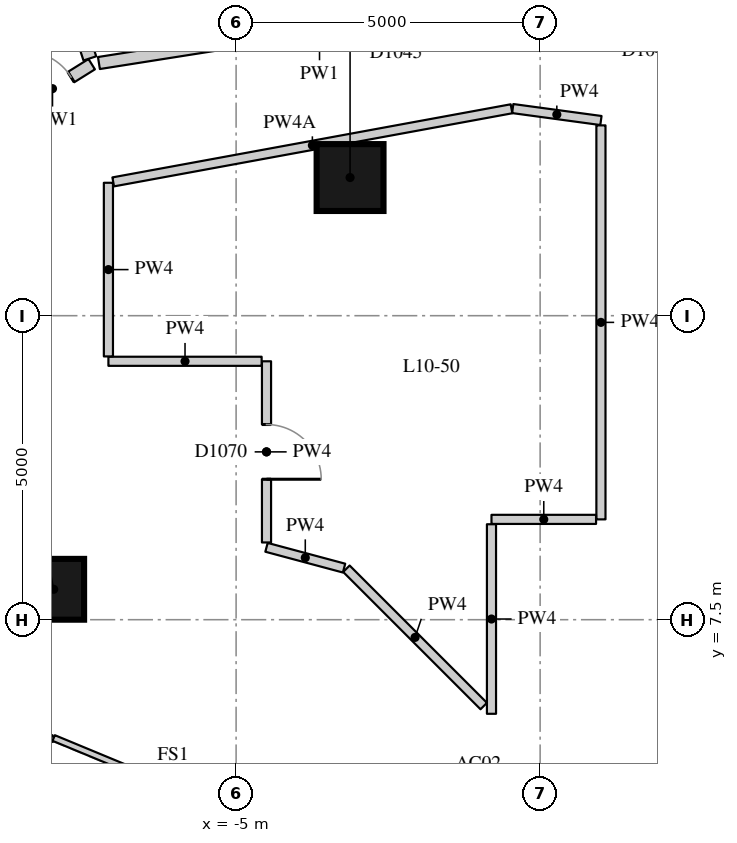
"""IFC4 building model, lengths in metres.
Left out: names, types, materials, properties, quantities, classifications, styles, units other than length and angle.
Written with IfcOpenShell. Run it as: python <this file> out.ifc"""

import sys

from ifc_helpers import new_model, si_unit, direction, frame, frame_2d, origin, origin_2d, place, context, subcontext, project, spatial, rectangle, extrude, element, fill, save


model = new_model("IFC4")
c1 = context("Model", 3, precision=1e-05, world=origin(), true_north=direction((0.0, 1.0)))
c2 = subcontext(c1, "Body", "Model", "MODEL_VIEW")
j1 = project(units=[si_unit("LENGTHUNIT", "METRE"), si_unit("PLANEANGLEUNIT", "RADIAN")], contexts=[c1])
p1 = place(None, origin())
s1 = spatial("IfcSite", under=j1, at=p1, CompositionType="ELEMENT")
p2 = place(p1, origin())
s2 = spatial("IfcBuilding", under=s1, at=p2, CompositionType="ELEMENT")
p3 = place(p2, frame((0.0, 0.0, 41.5)))
s3 = spatial("IfcBuildingStorey", under=s2, at=p3, CompositionType="ELEMENT", Elevation=41.5)
p4 = place(p3, frame((-8.0, 8.0, 0.0), z_axis=(0.0, 0.0, 1.0), x_axis=(1.0, 0.0, 0.0)))
e1 = element("IfcColumn", 1, at=p4, inside=s3, PredefinedType="COLUMN", context=c2, shape_type="SweptSolid", body=[
    extrude(rectangle(XDim=1.0, YDim=1.0, at=origin_2d()), origin(), (0.0, 0.0, 1.0), 3.3),
])
p5 = place(p3, frame((-3.126, 14.772, 0.0), z_axis=(0.0, 0.0, 1.0), x_axis=(1.0, 0.0, 0.0)))
e2 = element("IfcColumn", 2, at=p5, inside=s3, PredefinedType="COLUMN", context=c2, shape_type="SweptSolid", body=[
    extrude(rectangle(XDim=1.1, YDim=1.1, at=origin_2d()), origin(), (0.0, 0.0, 1.0), 3.3),
])
p6 = place(p3, frame((-8.664, 15.832, 0.0), z_axis=(0.0, 0.0, 1.0), x_axis=(0.848304931689, 0.529508019648, 0.0)))
e3 = element("IfcWall", 3, at=p6, inside=s3, PredefinedType="PARTITIONING", context=c2, shape_type="SweptSolid", body=[
    extrude(rectangle(XDim=1.52, YDim=0.2, at=frame_2d((0.76, 0.0))), origin(), (0.0, 0.0, 1.0), 3.02),
])
p7 = place(p6, frame((0.22, 0.0, 0.0)))
e4 = element("IfcOpeningElement", 4, at=p7, cuts=e3, PredefinedType="OPENING", context=c2, shape_type="SweptSolid", body=[
    extrude(rectangle(XDim=0.9, YDim=2.1, at=frame_2d((0.45, 1.05))), frame((0.0, 0.11, 0.0), z_axis=(0.0, -1.0, 0.0), x_axis=(1.0, 0.0, 0.0)), (0.0, 0.0, 1.0), 0.22),
])
p8 = place(p3, frame((-7.256, 16.656, 0.0), z_axis=(0.0, 0.0, 1.0), x_axis=(0.987787475409, 0.15580726371, 0.0)))
e5 = element("IfcWall", 5, at=p8, inside=s3, PredefinedType="PARTITIONING", context=c2, shape_type="SweptSolid", body=[
    extrude(rectangle(XDim=7.346, YDim=0.2, at=frame_2d((3.673, 0.0))), origin(), (0.0, 0.0, 1.0), 3.02),
])
p9 = place(p8, frame((3.86, 0.0, 0.0)))
e6 = element("IfcOpeningElement", 6, at=p9, cuts=e5, PredefinedType="OPENING", context=c2, shape_type="SweptSolid", body=[
    extrude(rectangle(XDim=1.1, YDim=2.1, at=frame_2d((0.55, 1.05))), frame((0.0, 0.11, 0.0), z_axis=(0.0, -1.0, 0.0), x_axis=(1.0, 0.0, 0.0)), (0.0, 0.0, 1.0), 0.22),
])
p10 = place(p3, frame((0.098, 17.777, 0.0), z_axis=(0.0, 0.0, 1.0), x_axis=(0.97258196627, -0.232560355362, 0.0)))
e7 = element("IfcWall", 7, at=p10, inside=s3, PredefinedType="PARTITIONING", context=c2, shape_type="SweptSolid", body=[
    extrude(rectangle(XDim=10.933, YDim=0.2, at=frame_2d((5.466, 0.0))), origin(), (0.0, 0.0, 1.0), 3.02),
])
p11 = place(p10, frame((9.613, 0.0, 0.0)))
e8 = element("IfcOpeningElement", 8, at=p11, cuts=e7, PredefinedType="OPENING", context=c2, shape_type="SweptSolid", body=[
    extrude(rectangle(XDim=1.1, YDim=2.1, at=frame_2d((0.55, 1.05))), frame((0.0, 0.11, 0.0), z_axis=(0.0, -1.0, 0.0), x_axis=(1.0, 0.0, 0.0)), (0.0, 0.0, 1.0), 0.22),
])
p12 = place(p10, frame((4.325, 0.0, 0.0)))
e9 = element("IfcOpeningElement", 9, at=p12, cuts=e7, PredefinedType="OPENING", context=c2, shape_type="SweptSolid", body=[
    extrude(rectangle(XDim=1.0, YDim=2.1, at=frame_2d((0.5, 1.05))), frame((0.0, 0.11, 0.0), z_axis=(0.0, -1.0, 0.0), x_axis=(1.0, 0.0, 0.0)), (0.0, 0.0, 1.0), 0.22),
])
p13 = place(p10, frame((1.276, 0.0, 0.0)))
e10 = element("IfcOpeningElement", 10, at=p13, cuts=e7, PredefinedType="OPENING", context=c2, shape_type="SweptSolid", body=[
    extrude(rectangle(XDim=0.9, YDim=2.1, at=frame_2d((0.45, 1.05))), frame((0.0, 0.11, 0.0), z_axis=(0.0, -1.0, 0.0), x_axis=(1.0, 0.0, 0.0)), (0.0, 0.0, 1.0), 0.22),
])
p14 = place(p3, frame((-0.451, 15.907, 0.0), z_axis=(0.0, 0.0, 1.0), x_axis=(0.99094751199, -0.134249873301, 0.0)))
e11 = element("IfcWall", 11, at=p14, inside=s3, PredefinedType="PARTITIONING", context=c2, shape_type="SweptSolid", body=[
    extrude(rectangle(XDim=1.464, YDim=0.15, at=frame_2d((0.732, 0.0))), origin(), (0.0, 0.0, 1.0), 3.02),
])
p15 = place(p3, frame((1.0, 15.63, 0.0), z_axis=(0.0, 0.0, 1.0), x_axis=(0.0, -1.0, 0.0)))
e12 = element("IfcWall", 12, at=p15, inside=s3, PredefinedType="PARTITIONING", context=c2, shape_type="SweptSolid", body=[
    extrude(rectangle(XDim=6.48, YDim=0.15, at=frame_2d((3.24, 0.0))), origin(), (0.0, 0.0, 1.0), 2.47),
])
p16 = place(p3, frame((0.92, 9.15, 0.0), z_axis=(0.0, 0.0, 1.0), x_axis=(-1.0, 0.0, 0.0)))
e13 = element("IfcWall", 13, at=p16, inside=s3, PredefinedType="PARTITIONING", context=c2, shape_type="SweptSolid", body=[
    extrude(rectangle(XDim=1.72, YDim=0.15, at=frame_2d((0.86, 0.0))), origin(), (0.0, 0.0, 1.0), 3.02),
])
p17 = place(p3, frame((-0.8, 9.07, 0.0), z_axis=(0.0, 0.0, 1.0), x_axis=(0.0, -1.0, 0.0)))
e14 = element("IfcWall", 14, at=p17, inside=s3, PredefinedType="PARTITIONING", context=c2, shape_type="SweptSolid", body=[
    extrude(rectangle(XDim=3.118, YDim=0.15, at=frame_2d((1.559, 0.0))), origin(), (0.0, 0.0, 1.0), 3.02),
])
p18 = place(p3, frame((-0.927, 6.08, 0.0), z_axis=(0.0, 0.0, 1.0), x_axis=(-0.707106781187, 0.707106781187, 0.0)))
e15 = element("IfcWall", 15, at=p18, inside=s3, PredefinedType="PARTITIONING", context=c2, shape_type="SweptSolid", body=[
    extrude(rectangle(XDim=3.194, YDim=0.15, at=frame_2d((1.597, 0.0))), origin(), (0.0, 0.0, 1.0), 3.02),
])
p19 = place(p3, frame((-3.225, 8.348, 0.0), z_axis=(0.0, 0.0, 1.0), x_axis=(-0.965915035697, 0.258859312783, 0.0)))
e16 = element("IfcWall", 16, at=p19, inside=s3, PredefinedType="PARTITIONING", context=c2, shape_type="SweptSolid", body=[
    extrude(rectangle(XDim=1.32, YDim=0.15, at=frame_2d((0.66, 0.0))), origin(), (0.0, 0.0, 1.0), 3.02),
])
p20 = place(p3, frame((-4.5, 8.77, 0.0), z_axis=(0.0, 0.0, 1.0), x_axis=(0.0, 1.0, 0.0)))
e17 = element("IfcWall", 17, at=p20, inside=s3, PredefinedType="PARTITIONING", context=c2, shape_type="SweptSolid", body=[
    extrude(rectangle(XDim=2.98, YDim=0.15, at=frame_2d((1.49, 0.0))), origin(), (0.0, 0.0, 1.0), 3.02),
])
p21 = place(p20, frame((1.04, 0.0, 0.0)))
e18 = element("IfcOpeningElement", 18, at=p21, cuts=e17, PredefinedType="OPENING", context=c2, shape_type="SweptSolid", body=[
    extrude(rectangle(XDim=0.9, YDim=2.1, at=frame_2d((0.45, 1.05))), frame((0.0, 0.085, 0.0), z_axis=(0.0, -1.0, 0.0), x_axis=(1.0, 0.0, 0.0)), (0.0, 0.0, 1.0), 0.17),
])
p22 = place(p3, frame((-4.58, 11.75, 0.0), z_axis=(0.0, 0.0, 1.0), x_axis=(-1.0, 0.0, 0.0)))
e19 = element("IfcWall", 19, at=p22, inside=s3, PredefinedType="PARTITIONING", context=c2, shape_type="SweptSolid", body=[
    extrude(rectangle(XDim=2.52, YDim=0.15, at=frame_2d((1.26, 0.0))), origin(), (0.0, 0.0, 1.0), 3.02),
])
p23 = place(p3, frame((-7.1, 11.83, 0.0), z_axis=(0.0, 0.0, 1.0), x_axis=(0.0, 1.0, 0.0)))
e20 = element("IfcWall", 20, at=p23, inside=s3, PredefinedType="PARTITIONING", context=c2, shape_type="SweptSolid", body=[
    extrude(rectangle(XDim=2.856, YDim=0.15, at=frame_2d((1.428, 0.0))), origin(), (0.0, 0.0, 1.0), 3.02),
])
p24 = place(p3, frame((-7.021, 14.701, 0.0), z_axis=(0.0, 0.0, 1.0), x_axis=(0.983567630435, 0.180540068573, 0.0)))
e21 = element("IfcWall", 21, at=p24, inside=s3, PredefinedType="PARTITIONING", context=c2, shape_type="SweptSolid", body=[
    extrude(rectangle(XDim=6.66, YDim=0.15, at=frame_2d((3.33, 0.0))), origin(), (0.0, 0.0, 1.0), 2.57),
])
p25 = place(p3, frame((-9.034, 21.721, 0.0), z_axis=(0.0, 0.0, 1.0), x_axis=(0.310304845104, -0.950637103791, 0.0)))
e22 = element("IfcWall", 22, at=p25, inside=s3, PredefinedType="PARTITIONING", context=c2, shape_type="SweptSolid", body=[
    extrude(rectangle(XDim=5.249, YDim=0.22, at=frame_2d((2.624, 0.0))), origin(), (0.0, 0.0, 1.0), 3.02),
])
for number, where, z_axis, x_axis in (
    (23, (-11.927, 3.927, 0.0), (0.0, 0.0, 1.0), (0.924, 0.383, 0.0)),
    (24, (-8.0, 5.554, 0.0), (0.0, 0.0, 1.0), (0.924, -0.383, 0.0)),
):
    element("IfcWall", number, at=place(p3, frame(where, z_axis=z_axis, x_axis=x_axis)), inside=s3, PredefinedType="PARTITIONING", context=c2, shape_type="SweptSolid", body=[
        extrude(rectangle(XDim=4.251, YDim=0.1, at=frame_2d((2.125, 0.0))), origin(), (0.0, 0.0, 1.0), 3.02),
    ])
p26 = place(p7, origin())
e25 = element("IfcDoor", 25, at=p26, inside=s3, OperationType="SINGLE_SWING_LEFT", PredefinedType="DOOR", context=c2, shape_type="SweptSolid", body=[
    extrude(rectangle(XDim=0.9, YDim=2.1, at=frame_2d((0.45, 1.05))), frame((0.0, 0.025, 0.0), z_axis=(0.0, -1.0, 0.0), x_axis=(1.0, 0.0, 0.0)), (0.0, 0.0, 1.0), 0.05),
])
fill(e4, e25)
p27 = place(p21, origin())
e26 = element("IfcDoor", 26, at=p27, inside=s3, OperationType="SINGLE_SWING_RIGHT", PredefinedType="DOOR", context=c2, shape_type="SweptSolid", body=[
    extrude(rectangle(XDim=0.9, YDim=2.1, at=frame_2d((0.45, 1.05))), frame((0.0, 0.025, 0.0), z_axis=(0.0, -1.0, 0.0), x_axis=(1.0, 0.0, 0.0)), (0.0, 0.0, 1.0), 0.05),
])
fill(e18, e26)
save(model, sys.argv[1])
